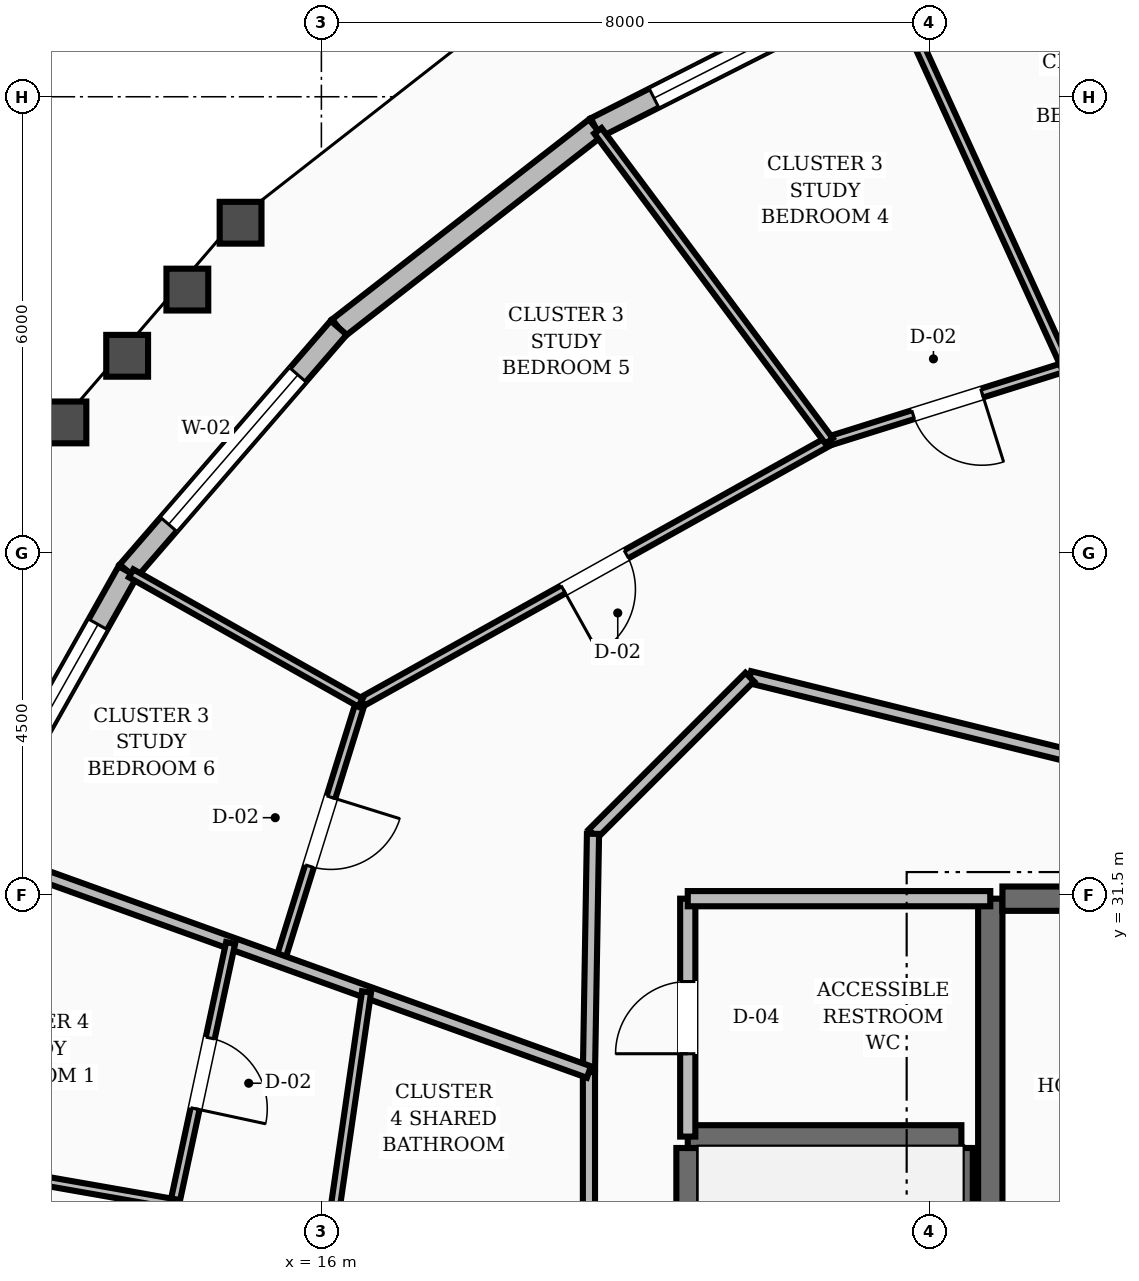
"""IFC4 building model, lengths in metres.
Left out: names, types, materials, properties, quantities, classifications, styles, units other than length and angle.
Written with IfcOpenShell. Run it as: python <this file> out.ifc"""

import sys

from ifc_helpers import new_model, si_unit, direction, frame, frame_2d, origin, place, context, subcontext, project, spatial, rectangle, extrude, element, fill, save


model = new_model("IFC4")
c1 = context("Model", 3, precision=1e-05, world=origin(), true_north=direction((0.0, 1.0)))
c2 = subcontext(c1, "Body", "Model", "MODEL_VIEW")
j1 = project(units=[si_unit("LENGTHUNIT", "METRE"), si_unit("PLANEANGLEUNIT", "RADIAN")], contexts=[c1])
p1 = place(None, origin())
s1 = spatial("IfcSite", under=j1, at=p1, CompositionType="ELEMENT")
p2 = place(p1, origin())
s2 = spatial("IfcBuilding", under=s1, at=p2, CompositionType="ELEMENT")
p3 = place(p2, frame((0.0, 0.0, 232.8)))
s3 = spatial("IfcBuildingStorey", under=s2, at=p3, CompositionType="ELEMENT", Elevation=232.8)
p4 = place(p3, frame((24.8, 25.15, 0.0), z_axis=(0.0, 0.0, 1.0), x_axis=(0.0, 1.0, 0.0)))
e1 = element("IfcWall", 1, at=p4, inside=s3, PredefinedType="SHEAR", context=c2, shape_type="SweptSolid", body=[
    extrude(rectangle(XDim=6.3, YDim=0.32, at=frame_2d((3.15, 0.0))), origin(), (0.0, 0.0, 1.0), 3.6),
])
p5 = place(p3, frame((24.96, 31.45, 0.0), z_axis=(0.0, 0.0, 1.0), x_axis=(1.0, 0.0, 0.0)))
e2 = element("IfcWall", 2, at=p5, inside=s3, PredefinedType="SHEAR", context=c2, shape_type="SweptSolid", body=[
    extrude(rectangle(XDim=3.24, YDim=0.32, at=frame_2d((1.62, 0.0))), origin(), (0.0, 0.0, 1.0), 3.6),
])
for number, where, z_axis, x_axis in (
    (3, (20.82, 19.43, 0.0), (0.0, 0.0, 1.0), (0.0, 1.0, 0.0)),
    (4, (24.42, 19.43, 0.0), (0.0, 0.0, 1.0), (0.0, 1.0, 0.0)),
):
    element("IfcWall", number, at=place(p3, frame(where, z_axis=z_axis, x_axis=x_axis)), inside=s3, PredefinedType="SHEAR", context=c2, shape_type="SweptSolid", body=[
        extrude(rectangle(XDim=8.74, YDim=0.3, at=frame_2d((4.37, 0.0))), origin(), (0.0, 0.0, 1.0), 3.6),
    ])
p6 = place(p3, frame((20.82, 28.32, 0.0), z_axis=(0.0, 0.0, 1.0), x_axis=(1.0, 0.0, 0.0)))
e5 = element("IfcWall", 5, at=p6, inside=s3, PredefinedType="SHEAR", context=c2, shape_type="SweptSolid", body=[
    extrude(rectangle(XDim=3.6, YDim=0.3, at=frame_2d((1.8, 0.0))), origin(), (0.0, 0.0, 1.0), 3.6),
])
p7 = place(p3, frame((23.464, 43.548, 0.0), z_axis=(0.0, 0.0, 1.0), x_axis=(-0.891906133231, -0.452220576162, 0.0)))
e6 = element("IfcWall", 6, at=p7, inside=s3, PredefinedType="STANDARD", context=c2, shape_type="SweptSolid", body=[
    extrude(rectangle(XDim=4.324, YDim=0.28, at=frame_2d((2.162, 0.0))), origin(), (0.0, 0.0, 1.0), 2.88),
])
p8 = place(p7, frame((0.862, 0.0, 0.8)))
e7 = element("IfcOpeningElement", 7, at=p8, cuts=e6, PredefinedType="OPENING", context=c2, shape_type="SweptSolid", body=[
    extrude(rectangle(XDim=2.6, YDim=1.65, at=frame_2d((1.3, 0.825))), frame((0.0, 0.15, 0.0), z_axis=(0.0, -1.0, 0.0), x_axis=(1.0, 0.0, 0.0)), (0.0, 0.0, 1.0), 0.3),
])
p9 = place(p3, frame((19.607, 41.592, 0.0), z_axis=(0.0, 0.0, 1.0), x_axis=(-0.789112773216, -0.614248346475, 0.0)))
e8 = element("IfcWall", 8, at=p9, inside=s3, PredefinedType="STANDARD", context=c2, shape_type="SweptSolid", body=[
    extrude(rectangle(XDim=4.283, YDim=0.28, at=frame_2d((2.142, 0.0))), origin(), (0.0, 0.0, 1.0), 2.88),
])
p10 = place(p3, frame((16.227, 38.961, 0.0), z_axis=(0.0, 0.0, 1.0), x_axis=(-0.654274793638, -0.756256897099, 0.0)))
e9 = element("IfcWall", 9, at=p10, inside=s3, PredefinedType="STANDARD", context=c2, shape_type="SweptSolid", body=[
    extrude(rectangle(XDim=4.24, YDim=0.28, at=frame_2d((2.12, 0.0))), origin(), (0.0, 0.0, 1.0), 2.88),
])
p11 = place(p10, frame((0.82, 0.0, 0.8)))
e10 = element("IfcOpeningElement", 10, at=p11, cuts=e9, PredefinedType="OPENING", context=c2, shape_type="SweptSolid", body=[
    extrude(rectangle(XDim=2.6, YDim=1.65, at=frame_2d((1.3, 0.825))), frame((0.0, 0.15, 0.0), z_axis=(0.0, -1.0, 0.0), x_axis=(1.0, 0.0, 0.0)), (0.0, 0.0, 1.0), 0.3),
])
p12 = place(p3, frame((13.453, 35.755, 0.0), z_axis=(0.0, 0.0, 1.0), x_axis=(-0.490926410902, -0.871201044007, 0.0)))
e11 = element("IfcWall", 11, at=p12, inside=s3, PredefinedType="STANDARD", context=c2, shape_type="SweptSolid", body=[
    extrude(rectangle(XDim=4.199, YDim=0.28, at=frame_2d((2.099, 0.0))), origin(), (0.0, 0.0, 1.0), 2.88),
])
p13 = place(p12, frame((0.799, 0.0, 0.8)))
e12 = element("IfcOpeningElement", 12, at=p13, cuts=e11, PredefinedType="OPENING", context=c2, shape_type="SweptSolid", body=[
    extrude(rectangle(XDim=2.6, YDim=1.65, at=frame_2d((1.3, 0.825))), frame((0.0, 0.15, 0.0), z_axis=(0.0, -1.0, 0.0), x_axis=(1.0, 0.0, 0.0)), (0.0, 0.0, 1.0), 0.3),
])
p14 = place(p3, frame((20.82, 28.32, 0.0), z_axis=(0.0, 0.0, 1.0), x_axis=(0.0, 1.0, 0.0)))
e13 = element("IfcWall", 13, at=p14, inside=s3, PredefinedType="SOLIDWALL", context=c2, shape_type="SweptSolid", body=[
    extrude(rectangle(XDim=3.13, YDim=0.2, at=frame_2d((1.565, 0.0))), origin(), (0.0, 0.0, 1.0), 2.87),
])
p15 = place(p14, frame((1.09, 0.0, 0.0)))
e14 = element("IfcOpeningElement", 14, at=p15, cuts=e13, PredefinedType="OPENING", context=c2, shape_type="SweptSolid", body=[
    extrude(rectangle(XDim=0.95, YDim=2.1, at=frame_2d((0.475, 1.05))), frame((0.0, 0.11, 0.0), z_axis=(0.0, -1.0, 0.0), x_axis=(1.0, 0.0, 0.0)), (0.0, 0.0, 1.0), 0.22),
])
p16 = place(p3, frame((20.82, 31.45, 0.0), z_axis=(0.0, 0.0, 1.0), x_axis=(1.0, 0.0, 0.0)))
e15 = element("IfcWall", 15, at=p16, inside=s3, PredefinedType="SOLIDWALL", context=c2, shape_type="SweptSolid", body=[
    extrude(rectangle(XDim=3.98, YDim=0.2, at=frame_2d((1.99, 0.0))), origin(), (0.0, 0.0, 1.0), 2.87),
])
p17 = place(p3, frame((25.752, 33.35, 0.0), z_axis=(0.0, 0.0, 1.0), x_axis=(-0.970939799552, 0.239323850978, 0.0)))
e16 = element("IfcWall", 16, at=p17, inside=s3, PredefinedType="SOLIDWALL", context=c2, shape_type="SweptSolid", body=[
    extrude(rectangle(XDim=4.241, YDim=0.16, at=frame_2d((2.12, 0.0))), origin(), (0.0, 0.0, 1.0), 2.87),
])
p18 = place(p3, frame((21.635, 34.365, 0.0), z_axis=(0.0, 0.0, 1.0), x_axis=(-0.707106781187, -0.707106781187, 0.0)))
e17 = element("IfcWall", 17, at=p18, inside=s3, PredefinedType="SOLIDWALL", context=c2, shape_type="SweptSolid", body=[
    extrude(rectangle(XDim=2.916, YDim=0.16, at=frame_2d((1.458, 0.0))), origin(), (0.0, 0.0, 1.0), 2.87),
])
p19 = place(p3, frame((19.573, 32.303, 0.0), z_axis=(0.0, 0.0, 1.0), x_axis=(-0.016981035134, -0.999855811828, 0.0)))
e18 = element("IfcWall", 18, at=p19, inside=s3, PredefinedType="SOLIDWALL", context=c2, shape_type="SweptSolid", body=[
    extrude(rectangle(XDim=3.134, YDim=0.16, at=frame_2d((1.567, 0.0))), origin(), (0.0, 0.0, 1.0), 2.87),
])
p20 = place(p3, frame((19.52, 29.169, 0.0), z_axis=(0.0, 0.0, 1.0), x_axis=(0.0, -1.0, 0.0)))
e19 = element("IfcWall", 19, at=p20, inside=s3, PredefinedType="SOLIDWALL", context=c2, shape_type="SweptSolid", body=[
    extrude(rectangle(XDim=2.687, YDim=0.16, at=frame_2d((1.344, 0.0))), origin(), (0.0, 0.0, 1.0), 2.87),
])
p21 = place(p3, frame((25.795, 38.449, 0.0), z_axis=(0.0, 0.0, 1.0), x_axis=(-0.954134762398, -0.299377446018, 0.0)))
e20 = element("IfcWall", 20, at=p21, inside=s3, PredefinedType="PARTITIONING", context=c2, shape_type="SweptSolid", body=[
    extrude(rectangle(XDim=3.265, YDim=0.12, at=frame_2d((1.633, 0.0))), origin(), (0.0, 0.0, 1.0), 2.87),
])
p22 = place(p21, frame((1.158, 0.0, 0.0)))
e21 = element("IfcOpeningElement", 21, at=p22, cuts=e20, PredefinedType="OPENING", context=c2, shape_type="SweptSolid", body=[
    extrude(rectangle(XDim=0.95, YDim=2.1, at=frame_2d((0.475, 1.05))), frame((0.0, 0.07, 0.0), z_axis=(0.0, -1.0, 0.0), x_axis=(1.0, 0.0, 0.0)), (0.0, 0.0, 1.0), 0.14),
])
p23 = place(p3, frame((25.795, 38.449, 0.0), z_axis=(0.0, 0.0, 1.0), x_axis=(-0.415854245642, 0.909431276338, 0.0)))
e22 = element("IfcWall", 22, at=p23, inside=s3, PredefinedType="PARTITIONING", context=c2, shape_type="SweptSolid", body=[
    extrude(rectangle(XDim=5.557, YDim=0.12, at=frame_2d((2.778, 0.0))), origin(), (0.0, 0.0, 1.0), 2.87),
])
p24 = place(p3, frame((22.68, 37.471, 0.0), z_axis=(0.0, 0.0, 1.0), x_axis=(-0.873183674394, -0.487391291234, 0.0)))
e23 = element("IfcWall", 23, at=p24, inside=s3, PredefinedType="PARTITIONING", context=c2, shape_type="SweptSolid", body=[
    extrude(rectangle(XDim=7.062, YDim=0.12, at=frame_2d((3.531, 0.0))), origin(), (0.0, 0.0, 1.0), 2.87),
])
p25 = place(p24, frame((3.056, 0.0, 0.0)))
e24 = element("IfcOpeningElement", 24, at=p25, cuts=e23, PredefinedType="OPENING", context=c2, shape_type="SweptSolid", body=[
    extrude(rectangle(XDim=0.95, YDim=2.1, at=frame_2d((0.475, 1.05))), frame((0.0, 0.07, 0.0), z_axis=(0.0, -1.0, 0.0), x_axis=(1.0, 0.0, 0.0)), (0.0, 0.0, 1.0), 0.14),
])
p26 = place(p3, frame((22.68, 37.471, 0.0), z_axis=(0.0, 0.0, 1.0), x_axis=(-0.597695366931, 0.801723299119, 0.0)))
e25 = element("IfcWall", 25, at=p26, inside=s3, PredefinedType="PARTITIONING", context=c2, shape_type="SweptSolid", body=[
    extrude(rectangle(XDim=5.09, YDim=0.12, at=frame_2d((2.545, 0.0))), origin(), (0.0, 0.0, 1.0), 2.87),
])
p27 = place(p3, frame((16.513, 34.029, 0.0), z_axis=(0.0, 0.0, 1.0), x_axis=(-0.297239013816, -0.954803104658, 0.0)))
e26 = element("IfcWall", 26, at=p27, inside=s3, PredefinedType="PARTITIONING", context=c2, shape_type="SweptSolid", body=[
    extrude(rectangle(XDim=3.556, YDim=0.12, at=frame_2d((1.778, 0.0))), origin(), (0.0, 0.0, 1.0), 2.87),
])
p28 = place(p27, frame((1.303, 0.0, 0.0)))
e27 = element("IfcOpeningElement", 27, at=p28, cuts=e26, PredefinedType="OPENING", context=c2, shape_type="SweptSolid", body=[
    extrude(rectangle(XDim=0.95, YDim=2.1, at=frame_2d((0.475, 1.05))), frame((0.0, 0.07, 0.0), z_axis=(0.0, -1.0, 0.0), x_axis=(1.0, 0.0, 0.0)), (0.0, 0.0, 1.0), 0.14),
])
p29 = place(p3, frame((16.513, 34.029, 0.0), z_axis=(0.0, 0.0, 1.0), x_axis=(-0.87102333073, 0.491241648606, 0.0)))
e28 = element("IfcWall", 28, at=p29, inside=s3, PredefinedType="PARTITIONING", context=c2, shape_type="SweptSolid", body=[
    extrude(rectangle(XDim=3.463, YDim=0.12, at=frame_2d((1.731, 0.0))), origin(), (0.0, 0.0, 1.0), 2.87),
])
p30 = place(p3, frame((19.52, 29.169, 0.0), z_axis=(0.0, 0.0, 1.0), x_axis=(-0.940833047992, 0.338870441032, 0.0)))
e29 = element("IfcWall", 29, at=p30, inside=s3, PredefinedType="SOLIDWALL", context=c2, shape_type="SweptSolid", body=[
    extrude(rectangle(XDim=8.589, YDim=0.16, at=frame_2d((4.295, 0.0))), origin(), (0.0, 0.0, 1.0), 2.87),
])
p31 = place(p3, frame((16.594, 30.223, 0.0), z_axis=(0.0, 0.0, 1.0), x_axis=(-0.14364473036, -0.98962932022, 0.0)))
e30 = element("IfcWall", 30, at=p31, inside=s3, PredefinedType="PARTITIONING", context=c2, shape_type="SweptSolid", body=[
    extrude(rectangle(XDim=3.182, YDim=0.12, at=frame_2d((1.591, 0.0))), origin(), (0.0, 0.0, 1.0), 2.87),
])
p32 = place(p3, frame((14.806, 30.867, 0.0), z_axis=(0.0, 0.0, 1.0), x_axis=(-0.209866475618, -0.977730056003, 0.0)))
e31 = element("IfcWall", 31, at=p32, inside=s3, PredefinedType="PARTITIONING", context=c2, shape_type="SweptSolid", body=[
    extrude(rectangle(XDim=3.509, YDim=0.12, at=frame_2d((1.754, 0.0))), origin(), (0.0, 0.0, 1.0), 2.87),
])
p33 = place(p32, frame((1.279, 0.0, 0.0)))
e32 = element("IfcOpeningElement", 32, at=p33, cuts=e31, PredefinedType="OPENING", context=c2, shape_type="SweptSolid", body=[
    extrude(rectangle(XDim=0.95, YDim=2.1, at=frame_2d((0.475, 1.05))), frame((0.0, 0.07, 0.0), z_axis=(0.0, -1.0, 0.0), x_axis=(1.0, 0.0, 0.0)), (0.0, 0.0, 1.0), 0.14),
])
p34 = place(p3, frame((14.07, 27.437, 0.0), z_axis=(0.0, 0.0, 1.0), x_axis=(-0.985016843907, 0.172458160782, 0.0)))
e33 = element("IfcWall", 33, at=p34, inside=s3, PredefinedType="PARTITIONING", context=c2, shape_type="SweptSolid", body=[
    extrude(rectangle(XDim=3.957, YDim=0.12, at=frame_2d((1.979, 0.0))), origin(), (0.0, 0.0, 1.0), 2.87),
])
p35 = place(p8, origin())
e34 = element("IfcWindow", 34, at=p35, inside=s3, PartitioningType="SINGLE_PANEL", PredefinedType="WINDOW", context=c2, shape_type="SweptSolid", body=[
    extrude(rectangle(XDim=2.6, YDim=1.65, at=frame_2d((1.3, 0.825))), frame((0.0, 0.03, 0.0), z_axis=(0.0, -1.0, 0.0), x_axis=(1.0, 0.0, 0.0)), (0.0, 0.0, 1.0), 0.06),
])
fill(e7, e34)
p36 = place(p11, origin())
e35 = element("IfcWindow", 35, at=p36, inside=s3, PartitioningType="SINGLE_PANEL", PredefinedType="WINDOW", context=c2, shape_type="SweptSolid", body=[
    extrude(rectangle(XDim=2.6, YDim=1.65, at=frame_2d((1.3, 0.825))), frame((0.0, 0.03, 0.0), z_axis=(0.0, -1.0, 0.0), x_axis=(1.0, 0.0, 0.0)), (0.0, 0.0, 1.0), 0.06),
])
fill(e10, e35)
p37 = place(p13, origin())
e36 = element("IfcWindow", 36, at=p37, inside=s3, PartitioningType="SINGLE_PANEL", PredefinedType="WINDOW", context=c2, shape_type="SweptSolid", body=[
    extrude(rectangle(XDim=2.6, YDim=1.65, at=frame_2d((1.3, 0.825))), frame((0.0, 0.03, 0.0), z_axis=(0.0, -1.0, 0.0), x_axis=(1.0, 0.0, 0.0)), (0.0, 0.0, 1.0), 0.06),
])
fill(e12, e36)
p38 = place(p15, origin())
e37 = element("IfcDoor", 37, at=p38, inside=s3, OperationType="SINGLE_SWING_LEFT", PredefinedType="DOOR", context=c2, shape_type="SweptSolid", body=[
    extrude(rectangle(XDim=0.95, YDim=2.1, at=frame_2d((0.475, 1.05))), frame((0.0, 0.025, 0.0), z_axis=(0.0, -1.0, 0.0), x_axis=(1.0, 0.0, 0.0)), (0.0, 0.0, 1.0), 0.05),
])
fill(e14, e37)
p39 = place(p22, origin())
e38 = element("IfcDoor", 38, at=p39, inside=s3, OperationType="SINGLE_SWING_LEFT", PredefinedType="DOOR", context=c2, shape_type="SweptSolid", body=[
    extrude(rectangle(XDim=0.95, YDim=2.1, at=frame_2d((0.475, 1.05))), frame((0.0, 0.025, 0.0), z_axis=(0.0, -1.0, 0.0), x_axis=(1.0, 0.0, 0.0)), (0.0, 0.0, 1.0), 0.05),
])
fill(e21, e38)
p40 = place(p25, origin())
e39 = element("IfcDoor", 39, at=p40, inside=s3, OperationType="SINGLE_SWING_RIGHT", PredefinedType="DOOR", context=c2, shape_type="SweptSolid", body=[
    extrude(rectangle(XDim=0.95, YDim=2.1, at=frame_2d((0.475, 1.05))), frame((0.0, 0.025, 0.0), z_axis=(0.0, -1.0, 0.0), x_axis=(1.0, 0.0, 0.0)), (0.0, 0.0, 1.0), 0.05),
])
fill(e24, e39)
p41 = place(p28, origin())
e40 = element("IfcDoor", 40, at=p41, inside=s3, OperationType="SINGLE_SWING_LEFT", PredefinedType="DOOR", context=c2, shape_type="SweptSolid", body=[
    extrude(rectangle(XDim=0.95, YDim=2.1, at=frame_2d((0.475, 1.05))), frame((0.0, 0.025, 0.0), z_axis=(0.0, -1.0, 0.0), x_axis=(1.0, 0.0, 0.0)), (0.0, 0.0, 1.0), 0.05),
])
fill(e27, e40)
p42 = place(p33, origin())
e41 = element("IfcDoor", 41, at=p42, inside=s3, OperationType="SINGLE_SWING_RIGHT", PredefinedType="DOOR", context=c2, shape_type="SweptSolid", body=[
    extrude(rectangle(XDim=0.95, YDim=2.1, at=frame_2d((0.475, 1.05))), frame((0.0, 0.025, 0.0), z_axis=(0.0, -1.0, 0.0), x_axis=(1.0, 0.0, 0.0)), (0.0, 0.0, 1.0), 0.05),
])
fill(e32, e41)
save(model, sys.argv[1])
